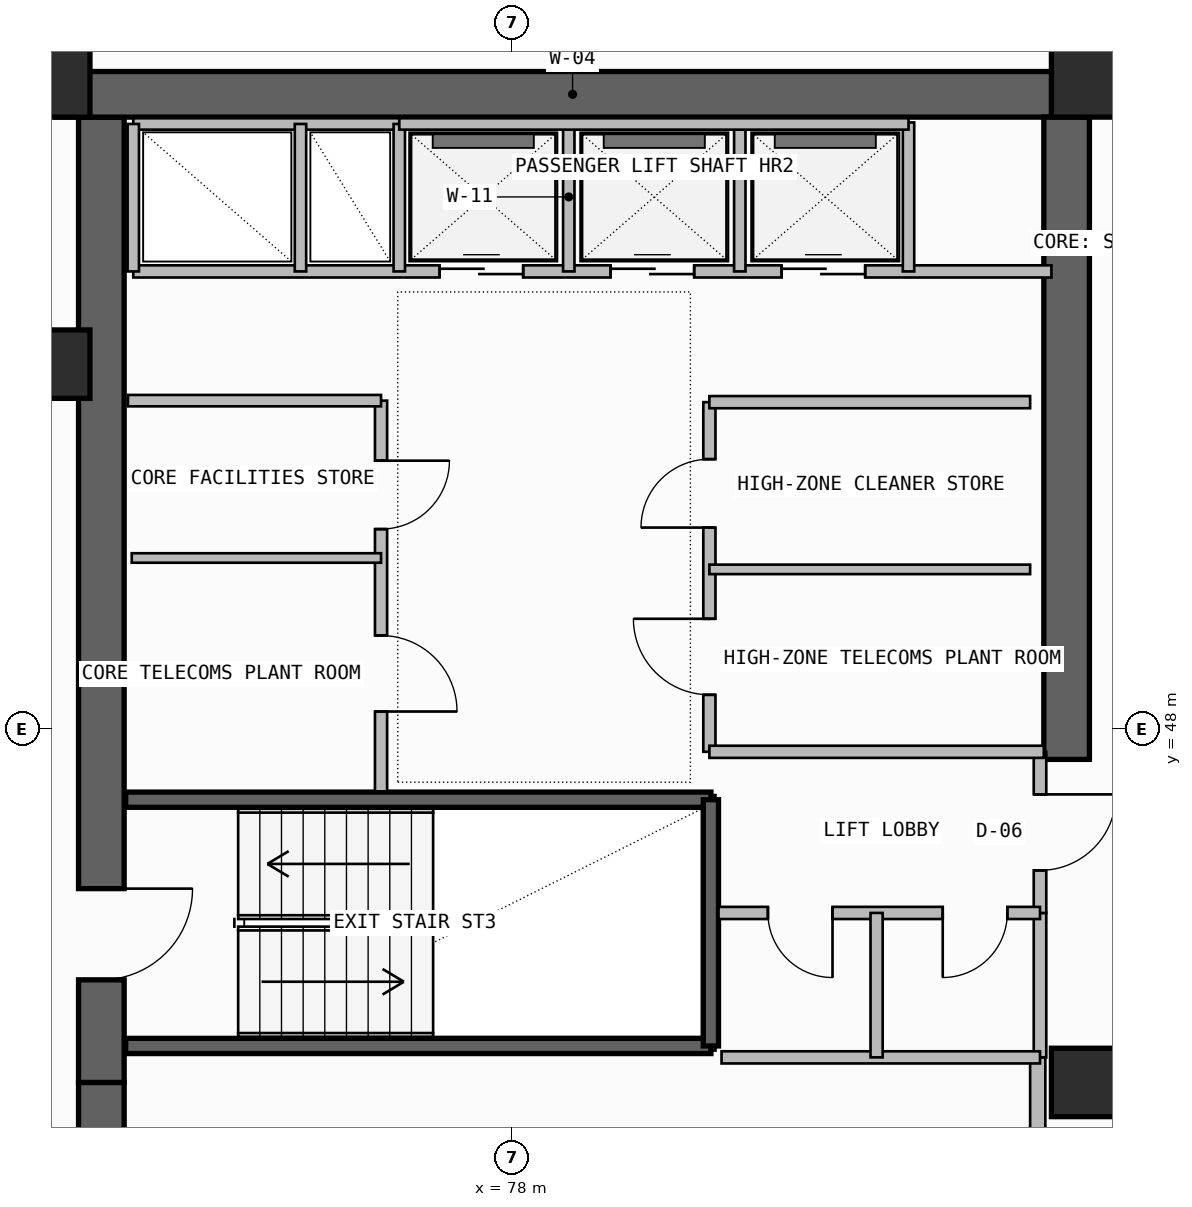
"""IFC4 building model, lengths in metres.
Left out: names, types, materials, properties, quantities, classifications, styles, units other than length and angle.
Written with IfcOpenShell. Run it as: python <this file> out.ifc"""

import sys

from ifc_helpers import new_model, si_unit, direction, frame, frame_2d, origin, origin_2d, place, context, subcontext, project, spatial, rectangle, extrude, element, fill, save


model = new_model("IFC4")
c1 = context("Model", 3, precision=1e-05, world=origin(), true_north=direction((0.0, 1.0)))
c2 = subcontext(c1, "Body", "Model", "MODEL_VIEW")
j1 = project(units=[si_unit("LENGTHUNIT", "METRE"), si_unit("PLANEANGLEUNIT", "RADIAN")], contexts=[c1])
p1 = place(None, origin())
s1 = spatial("IfcSite", under=j1, at=p1, CompositionType="ELEMENT")
p2 = place(p1, origin())
s2 = spatial("IfcBuilding", under=s1, at=p2, CompositionType="ELEMENT")
p3 = place(p2, frame((0.0, 0.0, 250.18)))
s3 = spatial("IfcBuildingStorey", under=s2, at=p3, CompositionType="ELEMENT", Elevation=250.18)
p4 = place(p3, frame((72.6, 35.5, -0.26), z_axis=(0.0, 0.0, 1.0), x_axis=(0.0, 1.0, 0.0)))
e1 = element("IfcWall", 1, at=p4, inside=s3, PredefinedType="SHEAR", context=c2, shape_type="SweptSolid", body=[
    extrude(rectangle(XDim=7.85, YDim=0.6, at=frame_2d((3.925, 0.0))), origin(), (0.0, 0.0, 1.0), 3.52),
])
p5 = place(p4, frame((1.45, 0.0, 0.26)))
e2 = element("IfcOpeningElement", 2, at=p5, cuts=e1, PredefinedType="OPENING", context=c2, shape_type="SweptSolid", body=[
    extrude(rectangle(XDim=1.2, YDim=2.2, at=frame_2d((0.6, 1.1))), frame((0.0, 0.31, 0.0), z_axis=(0.0, -1.0, 0.0), x_axis=(1.0, 0.0, 0.0)), (0.0, 0.0, 1.0), 0.62),
])
p6 = place(p3, frame((72.6, 43.35, -0.26), z_axis=(0.0, 0.0, 1.0), x_axis=(0.0, 1.0, 0.0)))
e3 = element("IfcWall", 3, at=p6, inside=s3, PredefinedType="SHEAR", context=c2, shape_type="SweptSolid", body=[
    extrude(rectangle(XDim=12.7, YDim=0.6, at=frame_2d((6.35, 0.0))), origin(), (0.0, 0.0, 1.0), 3.52),
])
p7 = place(p6, frame((1.35, 0.0, 0.26)))
e4 = element("IfcOpeningElement", 4, at=p7, cuts=e3, PredefinedType="OPENING", context=c2, shape_type="SweptSolid", body=[
    extrude(rectangle(XDim=1.2, YDim=2.2, at=frame_2d((0.6, 1.1))), frame((0.0, 0.31, 0.0), z_axis=(0.0, -1.0, 0.0), x_axis=(1.0, 0.0, 0.0)), (0.0, 0.0, 1.0), 0.62),
])
p8 = place(p3, frame((72.0, 56.35, -0.26), z_axis=(0.0, 0.0, 1.0), x_axis=(1.0, 0.0, 0.0)))
e5 = element("IfcWall", 5, at=p8, inside=s3, PredefinedType="SHEAR", context=c2, shape_type="SweptSolid", body=[
    extrude(rectangle(XDim=13.6, YDim=0.6, at=frame_2d((6.8, 0.0))), origin(), (0.0, 0.0, 1.0), 3.52),
])
p9 = place(p3, frame((85.3, 47.6, -0.26), z_axis=(0.0, 0.0, 1.0), x_axis=(0.0, 1.0, 0.0)))
e6 = element("IfcWall", 6, at=p9, inside=s3, PredefinedType="SHEAR", context=c2, shape_type="SweptSolid", body=[
    extrude(rectangle(XDim=8.45, YDim=0.6, at=frame_2d((4.225, 0.0))), origin(), (0.0, 0.0, 1.0), 3.52),
])
for number, where, z_axis, x_axis in (
    (7, (85.55, 43.35, 0.0), (0.0, 0.0, 1.0), (1.0, 0.0, 0.0)),
    (8, (72.0, 52.8, 0.0), (0.0, 0.0, 1.0), (1.0, 0.0, 0.0)),
    (9, (72.0, 56.5, 0.0), (0.0, 0.0, 1.0), (1.0, 0.0, 0.0)),
    (10, (85.55, 56.5, 0.0), (0.0, 0.0, 1.0), (1.0, 0.0, 0.0)),
):
    element("IfcColumn", number, at=place(p3, frame(where, z_axis=z_axis, x_axis=x_axis)), inside=s3, PredefinedType="COLUMN", context=c2, shape_type="SweptSolid", body=[
        extrude(rectangle(XDim=0.9, YDim=0.9, at=origin_2d()), origin(), (0.0, 0.0, 1.0), 3.52),
    ])
p10 = place(p3, frame((84.92, 38.85, 0.0), z_axis=(0.0, 0.0, 1.0), x_axis=(0.0, 1.0, 0.0)))
e11 = element("IfcWall", 11, at=p10, inside=s3, PredefinedType="SOLIDWALL", context=c2, shape_type="SweptSolid", body=[
    extrude(rectangle(XDim=4.83, YDim=0.2, at=frame_2d((2.415, 0.0))), origin(), (0.0, 0.0, 1.0), 3.26),
])
p11 = place(p10, frame((1.25, 0.0, 0.0)))
e12 = element("IfcOpeningElement", 12, at=p11, cuts=e11, PredefinedType="OPENING", context=c2, shape_type="SweptSolid", body=[
    extrude(rectangle(XDim=1.1, YDim=2.2, at=frame_2d((0.55, 1.1))), frame((0.0, 0.11, 0.0), z_axis=(0.0, -1.0, 0.0), x_axis=(1.0, 0.0, 0.0)), (0.0, 0.0, 1.0), 0.22),
])
for number, where, z_axis, x_axis in (
    (13, (72.92, 43.83, -0.26), (0.0, 0.0, 1.0), (1.0, 0.0, 0.0)),
    (14, (72.92, 47.07, -0.26), (0.0, 0.0, 1.0), (1.0, 0.0, 0.0)),
):
    element("IfcWall", number, at=place(p3, frame(where, z_axis=z_axis, x_axis=x_axis)), inside=s3, PredefinedType="SOLIDWALL", context=c2, shape_type="SweptSolid", body=[
        extrude(rectangle(XDim=7.7, YDim=0.2, at=frame_2d((3.85, 0.0))), origin(), (0.0, 0.0, 1.0), 3.52),
    ])
p12 = place(p3, frame((80.62, 43.83, -0.26), z_axis=(0.0, 0.0, 1.0), x_axis=(0.0, 1.0, 0.0)))
e15 = element("IfcWall", 15, at=p12, inside=s3, PredefinedType="SOLIDWALL", context=c2, shape_type="SweptSolid", body=[
    extrude(rectangle(XDim=3.24, YDim=0.2, at=frame_2d((1.62, 0.0))), origin(), (0.0, 0.0, 1.0), 3.52),
])
p13 = place(p3, frame((84.95, 43.68, 0.0), z_axis=(0.0, 0.0, 1.0), x_axis=(0.0, 1.0, 0.0)))
e16 = element("IfcWall", 16, at=p13, inside=s3, PredefinedType="PLUMBINGWALL", context=c2, shape_type="SweptSolid", body=[
    extrude(rectangle(XDim=1.9, YDim=0.165, at=frame_2d((0.95, 0.0))), origin(), (0.0, 0.0, 1.0), 3.26),
])
p14 = place(p3, frame((84.95, 45.58, 0.0), z_axis=(0.0, 0.0, 1.0), x_axis=(0.0, 1.0, 0.0)))
e17 = element("IfcWall", 17, at=p14, inside=s3, PredefinedType="PARTITIONING", context=c2, shape_type="SweptSolid", body=[
    extrude(rectangle(XDim=2.12, YDim=0.165, at=frame_2d((1.06, 0.0))), origin(), (0.0, 0.0, 1.0), 3.26),
])
p15 = place(p14, frame((0.56, 0.0, 0.0)))
e18 = element("IfcOpeningElement", 18, at=p15, cuts=e17, PredefinedType="OPENING", context=c2, shape_type="SweptSolid", body=[
    extrude(rectangle(XDim=1.0, YDim=2.2, at=frame_2d((0.5, 1.1))), frame((0.0, 0.093, 0.0), z_axis=(0.0, -1.0, 0.0), x_axis=(1.0, 0.0, 0.0)), (0.0, 0.0, 1.0), 0.185),
])
p16 = place(p3, frame((80.72, 45.58, 0.0), z_axis=(0.0, 0.0, 1.0), x_axis=(1.0, 0.0, 0.0)))
e19 = element("IfcWall", 19, at=p16, inside=s3, PredefinedType="PLUMBINGWALL", context=c2, shape_type="SweptSolid", body=[
    extrude(rectangle(XDim=4.23, YDim=0.16, at=frame_2d((2.115, 0.0))), origin(), (0.0, 0.0, 1.0), 3.26),
])
p17 = place(p16, frame((0.65, 0.0, 0.0)))
e20 = element("IfcOpeningElement", 20, at=p17, cuts=e19, PredefinedType="OPENING", context=c2, shape_type="SweptSolid", body=[
    extrude(rectangle(XDim=0.85, YDim=2.05, at=frame_2d((0.425, 1.025))), frame((0.0, 0.09, 0.0), z_axis=(0.0, -1.0, 0.0), x_axis=(1.0, 0.0, 0.0)), (0.0, 0.0, 1.0), 0.18),
])
p18 = place(p16, frame((2.95, 0.0, 0.0)))
e21 = element("IfcOpeningElement", 21, at=p18, cuts=e19, PredefinedType="OPENING", context=c2, shape_type="SweptSolid", body=[
    extrude(rectangle(XDim=0.85, YDim=2.05, at=frame_2d((0.425, 1.025))), frame((0.0, 0.09, 0.0), z_axis=(0.0, -1.0, 0.0), x_axis=(1.0, 0.0, 0.0)), (0.0, 0.0, 1.0), 0.18),
])
p19 = place(p3, frame((80.76, 43.68, 0.0), z_axis=(0.0, 0.0, 1.0), x_axis=(1.0, 0.0, 0.0)))
e22 = element("IfcWall", 22, at=p19, inside=s3, PredefinedType="PLUMBINGWALL", context=c2, shape_type="SweptSolid", body=[
    extrude(rectangle(XDim=4.19, YDim=0.16, at=frame_2d((2.095, 0.0))), origin(), (0.0, 0.0, 1.0), 3.26),
])
p20 = place(p3, frame((82.8, 43.68, 0.0), z_axis=(0.0, 0.0, 1.0), x_axis=(0.0, 1.0, 0.0)))
e23 = element("IfcWall", 23, at=p20, inside=s3, PredefinedType="PLUMBINGWALL", context=c2, shape_type="SweptSolid", body=[
    extrude(rectangle(XDim=1.9, YDim=0.16, at=frame_2d((0.95, 0.0))), origin(), (0.0, 0.0, 1.0), 3.26),
])
p21 = place(p3, frame((76.28, 47.18, 0.0), z_axis=(0.0, 0.0, 1.0), x_axis=(0.0, 1.0, 0.0)))
e24 = element("IfcWall", 24, at=p21, inside=s3, PredefinedType="SOLIDWALL", context=c2, shape_type="SweptSolid", body=[
    extrude(rectangle(XDim=5.14, YDim=0.16, at=frame_2d((2.57, 0.0))), origin(), (0.0, 0.0, 1.0), 3.26),
])
p22 = place(p21, frame((1.05, 0.0, 0.0)))
e25 = element("IfcOpeningElement", 25, at=p22, cuts=e24, PredefinedType="OPENING", context=c2, shape_type="SweptSolid", body=[
    extrude(rectangle(XDim=1.0, YDim=2.2, at=frame_2d((0.5, 1.1))), frame((0.0, 0.09, 0.0), z_axis=(0.0, -1.0, 0.0), x_axis=(1.0, 0.0, 0.0)), (0.0, 0.0, 1.0), 0.18),
])
p23 = place(p21, frame((3.45, 0.0, 0.0)))
e26 = element("IfcOpeningElement", 26, at=p23, cuts=e24, PredefinedType="OPENING", context=c2, shape_type="SweptSolid", body=[
    extrude(rectangle(XDim=0.9, YDim=2.1, at=frame_2d((0.45, 1.05))), frame((0.0, 0.09, 0.0), z_axis=(0.0, -1.0, 0.0), x_axis=(1.0, 0.0, 0.0)), (0.0, 0.0, 1.0), 0.18),
])
p24 = place(p3, frame((72.95, 52.32, 0.0), z_axis=(0.0, 0.0, 1.0), x_axis=(1.0, 0.0, 0.0)))
e27 = element("IfcWall", 27, at=p24, inside=s3, PredefinedType="SOLIDWALL", context=c2, shape_type="SweptSolid", body=[
    extrude(rectangle(XDim=3.33, YDim=0.15, at=frame_2d((1.665, 0.0))), origin(), (0.0, 0.0, 1.0), 3.26),
])
p25 = place(p3, frame((73.0, 50.25, 0.0), z_axis=(0.0, 0.0, 1.0), x_axis=(1.0, 0.0, 0.0)))
e28 = element("IfcWall", 28, at=p25, inside=s3, PredefinedType="PARTITIONING", context=c2, shape_type="SweptSolid", body=[
    extrude(rectangle(XDim=3.28, YDim=0.125, at=frame_2d((1.64, 0.0))), origin(), (0.0, 0.0, 1.0), 3.26),
])
p26 = place(p3, frame((80.6, 47.7, 0.0), z_axis=(0.0, 0.0, 1.0), x_axis=(0.0, 1.0, 0.0)))
e29 = element("IfcWall", 29, at=p26, inside=s3, PredefinedType="SOLIDWALL", context=c2, shape_type="SweptSolid", body=[
    extrude(rectangle(XDim=4.6, YDim=0.16, at=frame_2d((2.3, 0.0))), origin(), (0.0, 0.0, 1.0), 3.26),
])
p27 = place(p26, frame((0.75, 0.0, 0.0)))
e30 = element("IfcOpeningElement", 30, at=p27, cuts=e29, PredefinedType="OPENING", context=c2, shape_type="SweptSolid", body=[
    extrude(rectangle(XDim=1.0, YDim=2.2, at=frame_2d((0.5, 1.1))), frame((0.0, 0.09, 0.0), z_axis=(0.0, -1.0, 0.0), x_axis=(1.0, 0.0, 0.0)), (0.0, 0.0, 1.0), 0.18),
])
p28 = place(p26, frame((2.95, 0.0, 0.0)))
e31 = element("IfcOpeningElement", 31, at=p28, cuts=e29, PredefinedType="OPENING", context=c2, shape_type="SweptSolid", body=[
    extrude(rectangle(XDim=0.9, YDim=2.1, at=frame_2d((0.45, 1.05))), frame((0.0, 0.09, 0.0), z_axis=(0.0, -1.0, 0.0), x_axis=(1.0, 0.0, 0.0)), (0.0, 0.0, 1.0), 0.18),
])
p29 = place(p3, frame((80.6, 47.7, 0.0), z_axis=(0.0, 0.0, 1.0), x_axis=(1.0, 0.0, 0.0)))
e32 = element("IfcWall", 32, at=p29, inside=s3, PredefinedType="SOLIDWALL", context=c2, shape_type="SweptSolid", body=[
    extrude(rectangle(XDim=4.4, YDim=0.16, at=frame_2d((2.2, 0.0))), origin(), (0.0, 0.0, 1.0), 3.26),
])
p30 = place(p3, frame((80.6, 52.3, 0.0), z_axis=(0.0, 0.0, 1.0), x_axis=(1.0, 0.0, 0.0)))
e33 = element("IfcWall", 33, at=p30, inside=s3, PredefinedType="SOLIDWALL", context=c2, shape_type="SweptSolid", body=[
    extrude(rectangle(XDim=4.22, YDim=0.16, at=frame_2d((2.11, 0.0))), origin(), (0.0, 0.0, 1.0), 3.26),
])
p31 = place(p3, frame((80.6, 50.1, 0.0), z_axis=(0.0, 0.0, 1.0), x_axis=(1.0, 0.0, 0.0)))
e34 = element("IfcWall", 34, at=p31, inside=s3, PredefinedType="PARTITIONING", context=c2, shape_type="SweptSolid", body=[
    extrude(rectangle(XDim=4.22, YDim=0.125, at=frame_2d((2.11, 0.0))), origin(), (0.0, 0.0, 1.0), 3.26),
])
p32 = place(p3, frame((73.02, 54.02, 0.0), z_axis=(0.0, 0.0, 1.0), x_axis=(1.0, 0.0, 0.0)))
e35 = element("IfcWall", 35, at=p32, inside=s3, PredefinedType="SOLIDWALL", context=c2, shape_type="SweptSolid", body=[
    extrude(rectangle(XDim=12.08, YDim=0.16, at=frame_2d((6.04, 0.0))), origin(), (0.0, 0.0, 1.0), 3.26),
])
p33 = place(p32, frame((4.03, 0.0, 0.0)))
e36 = element("IfcOpeningElement", 36, at=p33, cuts=e35, PredefinedType="OPENING", context=c2, shape_type="SweptSolid", body=[
    extrude(rectangle(XDim=1.1, YDim=2.25, at=frame_2d((0.55, 1.125))), frame((0.0, 0.09, 0.0), z_axis=(0.0, -1.0, 0.0), x_axis=(1.0, 0.0, 0.0)), (0.0, 0.0, 1.0), 0.18),
])
p34 = place(p32, frame((6.28, 0.0, 0.0)))
e37 = element("IfcOpeningElement", 37, at=p34, cuts=e35, PredefinedType="OPENING", context=c2, shape_type="SweptSolid", body=[
    extrude(rectangle(XDim=1.1, YDim=2.25, at=frame_2d((0.55, 1.125))), frame((0.0, 0.09, 0.0), z_axis=(0.0, -1.0, 0.0), x_axis=(1.0, 0.0, 0.0)), (0.0, 0.0, 1.0), 0.18),
])
p35 = place(p32, frame((8.53, 0.0, 0.0)))
e38 = element("IfcOpeningElement", 38, at=p35, cuts=e35, PredefinedType="OPENING", context=c2, shape_type="SweptSolid", body=[
    extrude(rectangle(XDim=1.1, YDim=2.25, at=frame_2d((0.55, 1.125))), frame((0.0, 0.09, 0.0), z_axis=(0.0, -1.0, 0.0), x_axis=(1.0, 0.0, 0.0)), (0.0, 0.0, 1.0), 0.18),
])
p36 = place(p3, frame((73.02, 55.96, 0.0), z_axis=(0.0, 0.0, 1.0), x_axis=(1.0, 0.0, 0.0)))
e39 = element("IfcWall", 39, at=p36, inside=s3, PredefinedType="SOLIDWALL", context=c2, shape_type="SweptSolid", body=[
    extrude(rectangle(XDim=3.5, YDim=0.15, at=frame_2d((1.75, 0.0))), origin(), (0.0, 0.0, 1.0), 3.26),
])
p37 = place(p3, frame((73.02, 54.02, 0.0), z_axis=(0.0, 0.0, 1.0), x_axis=(0.0, 1.0, 0.0)))
e40 = element("IfcWall", 40, at=p37, inside=s3, PredefinedType="PLUMBINGWALL", context=c2, shape_type="SweptSolid", body=[
    extrude(rectangle(XDim=1.94, YDim=0.15, at=frame_2d((0.97, 0.0))), origin(), (0.0, 0.0, 1.0), 3.26),
])
p38 = place(p3, frame((76.52, 54.02, 0.0), z_axis=(0.0, 0.0, 1.0), x_axis=(0.0, 1.0, 0.0)))
e41 = element("IfcWall", 41, at=p38, inside=s3, PredefinedType="SOLIDWALL", context=c2, shape_type="SweptSolid", body=[
    extrude(rectangle(XDim=1.94, YDim=0.15, at=frame_2d((0.97, 0.0))), origin(), (0.0, 0.0, 1.0), 3.26),
])
p39 = place(p3, frame((75.22, 54.02, 0.0), z_axis=(0.0, 0.0, 1.0), x_axis=(0.0, 1.0, 0.0)))
e42 = element("IfcWall", 42, at=p39, inside=s3, PredefinedType="PLUMBINGWALL", context=c2, shape_type="SweptSolid", body=[
    extrude(rectangle(XDim=1.94, YDim=0.15, at=frame_2d((0.97, 0.0))), origin(), (0.0, 0.0, 1.0), 3.26),
])
for number, where, z_axis, x_axis in (
    (43, (78.75, 54.02, 0.0), (0.0, 0.0, 1.0), (0.0, 1.0, 0.0)),
    (44, (81.0, 54.02, 0.0), (0.0, 0.0, 1.0), (0.0, 1.0, 0.0)),
):
    element("IfcWall", number, at=place(p3, frame(where, z_axis=z_axis, x_axis=x_axis)), inside=s3, PredefinedType="PLUMBINGWALL", context=c2, shape_type="SweptSolid", body=[
        extrude(rectangle(XDim=1.96, YDim=0.15, at=frame_2d((0.98, 0.0))), origin(), (0.0, 0.0, 1.0), 3.26),
    ])
p40 = place(p3, frame((83.22, 54.02, 0.0), z_axis=(0.0, 0.0, 1.0), x_axis=(0.0, 1.0, 0.0)))
e45 = element("IfcWall", 45, at=p40, inside=s3, PredefinedType="SOLIDWALL", context=c2, shape_type="SweptSolid", body=[
    extrude(rectangle(XDim=1.96, YDim=0.15, at=frame_2d((0.98, 0.0))), origin(), (0.0, 0.0, 1.0), 3.26),
])
p41 = place(p3, frame((76.52, 55.96, 0.0), z_axis=(0.0, 0.0, 1.0), x_axis=(1.0, 0.0, 0.0)))
e46 = element("IfcWall", 46, at=p41, inside=s3, PredefinedType="SOLIDWALL", context=c2, shape_type="SweptSolid", body=[
    extrude(rectangle(XDim=6.7, YDim=0.15, at=frame_2d((3.35, 0.0))), origin(), (0.0, 0.0, 1.0), 3.26),
])
p42 = place(p7, frame((1.2, 0.0, 0.0), z_axis=(0.0, 0.0, 1.0), x_axis=(-1.0, 0.0, 0.0)))
e47 = element("IfcDoor", 47, at=p42, inside=s3, OperationType="SINGLE_SWING_LEFT", PredefinedType="USERDEFINED", context=c2, shape_type="SweptSolid", body=[
    extrude(rectangle(XDim=1.2, YDim=2.2, at=frame_2d((0.6, 1.1))), frame((0.0, 0.025, 0.0), z_axis=(0.0, -1.0, 0.0), x_axis=(1.0, 0.0, 0.0)), (0.0, 0.0, 1.0), 0.05),
])
fill(e4, e47)
p43 = place(p15, frame((1.0, 0.0, 0.0), z_axis=(0.0, 0.0, 1.0), x_axis=(-1.0, 0.0, 0.0)))
e48 = element("IfcDoor", 48, at=p43, inside=s3, OperationType="SINGLE_SWING_LEFT", PredefinedType="DOOR", context=c2, shape_type="SweptSolid", body=[
    extrude(rectangle(XDim=1.0, YDim=2.2, at=frame_2d((0.5, 1.1))), frame((0.0, 0.025, 0.0), z_axis=(0.0, -1.0, 0.0), x_axis=(1.0, 0.0, 0.0)), (0.0, 0.0, 1.0), 0.05),
])
fill(e18, e48)
p44 = place(p17, frame((0.85, 0.0, 0.0), z_axis=(0.0, 0.0, 1.0), x_axis=(-1.0, 0.0, 0.0)))
e49 = element("IfcDoor", 49, at=p44, inside=s3, OperationType="SINGLE_SWING_LEFT", PredefinedType="DOOR", context=c2, shape_type="SweptSolid", body=[
    extrude(rectangle(XDim=0.85, YDim=2.05, at=frame_2d((0.425, 1.025))), frame((0.0, 0.025, 0.0), z_axis=(0.0, -1.0, 0.0), x_axis=(1.0, 0.0, 0.0)), (0.0, 0.0, 1.0), 0.05),
])
fill(e20, e49)
p45 = place(p18, frame((0.85, 0.0, 0.0), z_axis=(0.0, 0.0, 1.0), x_axis=(-1.0, 0.0, 0.0)))
e50 = element("IfcDoor", 50, at=p45, inside=s3, OperationType="SINGLE_SWING_RIGHT", PredefinedType="DOOR", context=c2, shape_type="SweptSolid", body=[
    extrude(rectangle(XDim=0.85, YDim=2.05, at=frame_2d((0.425, 1.025))), frame((0.0, 0.025, 0.0), z_axis=(0.0, -1.0, 0.0), x_axis=(1.0, 0.0, 0.0)), (0.0, 0.0, 1.0), 0.05),
])
fill(e21, e50)
p46 = place(p22, frame((1.0, 0.0, 0.0), z_axis=(0.0, 0.0, 1.0), x_axis=(-1.0, 0.0, 0.0)))
e51 = element("IfcDoor", 51, at=p46, inside=s3, OperationType="SINGLE_SWING_RIGHT", PredefinedType="DOOR", context=c2, shape_type="SweptSolid", body=[
    extrude(rectangle(XDim=1.0, YDim=2.2, at=frame_2d((0.5, 1.1))), frame((0.0, 0.025, 0.0), z_axis=(0.0, -1.0, 0.0), x_axis=(1.0, 0.0, 0.0)), (0.0, 0.0, 1.0), 0.05),
])
fill(e25, e51)
p47 = place(p23, frame((0.9, 0.0, 0.0), z_axis=(0.0, 0.0, 1.0), x_axis=(-1.0, 0.0, 0.0)))
e52 = element("IfcDoor", 52, at=p47, inside=s3, OperationType="SINGLE_SWING_LEFT", PredefinedType="DOOR", context=c2, shape_type="SweptSolid", body=[
    extrude(rectangle(XDim=0.9, YDim=2.1, at=frame_2d((0.45, 1.05))), frame((0.0, 0.025, 0.0), z_axis=(0.0, -1.0, 0.0), x_axis=(1.0, 0.0, 0.0)), (0.0, 0.0, 1.0), 0.05),
])
fill(e26, e52)
p48 = place(p27, origin())
e53 = element("IfcDoor", 53, at=p48, inside=s3, OperationType="SINGLE_SWING_RIGHT", PredefinedType="DOOR", context=c2, shape_type="SweptSolid", body=[
    extrude(rectangle(XDim=1.0, YDim=2.2, at=frame_2d((0.5, 1.1))), frame((0.0, 0.025, 0.0), z_axis=(0.0, -1.0, 0.0), x_axis=(1.0, 0.0, 0.0)), (0.0, 0.0, 1.0), 0.05),
])
fill(e30, e53)
p49 = place(p28, origin())
e54 = element("IfcDoor", 54, at=p49, inside=s3, OperationType="SINGLE_SWING_LEFT", PredefinedType="DOOR", context=c2, shape_type="SweptSolid", body=[
    extrude(rectangle(XDim=0.9, YDim=2.1, at=frame_2d((0.45, 1.05))), frame((0.0, 0.025, 0.0), z_axis=(0.0, -1.0, 0.0), x_axis=(1.0, 0.0, 0.0)), (0.0, 0.0, 1.0), 0.05),
])
fill(e31, e54)
p50 = place(p33, origin())
e55 = element("IfcDoor", 55, at=p50, inside=s3, OperationType="DOUBLE_DOOR_SLIDING", PredefinedType="DOOR", context=c2, shape_type="SweptSolid", body=[
    extrude(rectangle(XDim=1.1, YDim=2.25, at=frame_2d((0.55, 1.125))), frame((0.0, 0.025, 0.0), z_axis=(0.0, -1.0, 0.0), x_axis=(1.0, 0.0, 0.0)), (0.0, 0.0, 1.0), 0.05),
])
fill(e36, e55)
p51 = place(p34, origin())
e56 = element("IfcDoor", 56, at=p51, inside=s3, OperationType="DOUBLE_DOOR_SLIDING", PredefinedType="DOOR", context=c2, shape_type="SweptSolid", body=[
    extrude(rectangle(XDim=1.1, YDim=2.25, at=frame_2d((0.55, 1.125))), frame((0.0, 0.025, 0.0), z_axis=(0.0, -1.0, 0.0), x_axis=(1.0, 0.0, 0.0)), (0.0, 0.0, 1.0), 0.05),
])
fill(e37, e56)
p52 = place(p35, origin())
e57 = element("IfcDoor", 57, at=p52, inside=s3, OperationType="DOUBLE_DOOR_SLIDING", PredefinedType="DOOR", context=c2, shape_type="SweptSolid", body=[
    extrude(rectangle(XDim=1.1, YDim=2.25, at=frame_2d((0.55, 1.125))), frame((0.0, 0.025, 0.0), z_axis=(0.0, -1.0, 0.0), x_axis=(1.0, 0.0, 0.0)), (0.0, 0.0, 1.0), 0.05),
])
fill(e38, e57)
save(model, sys.argv[1])
